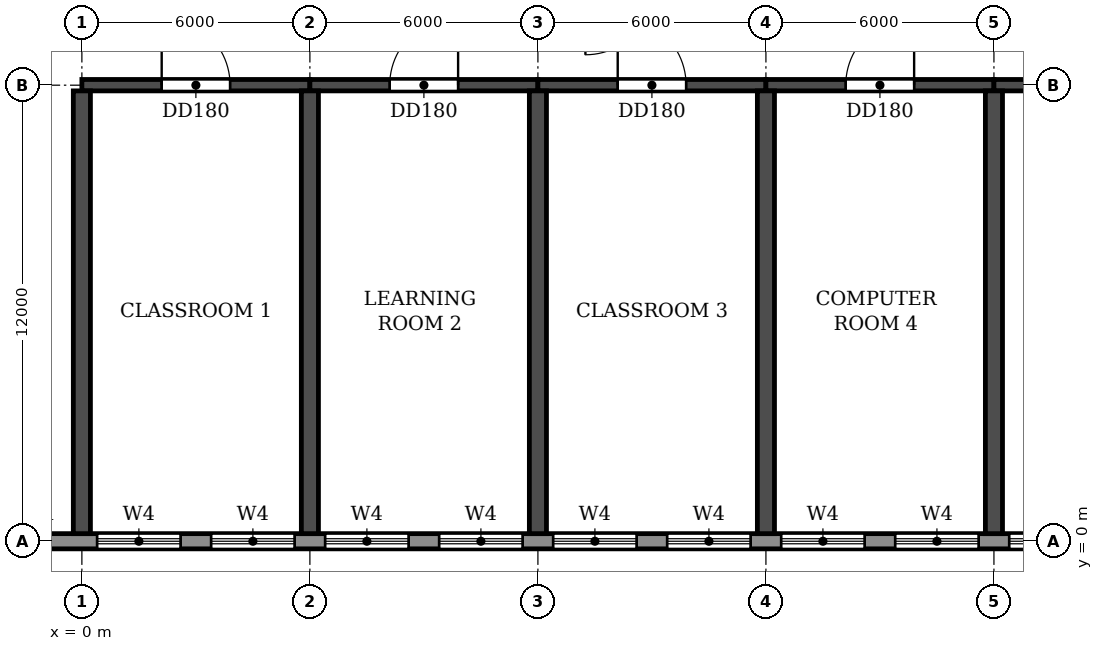
"""IFC4 building model, lengths in metres.
Left out: names, types, materials, properties, quantities, classifications, styles, units other than length and angle.
Written with IfcOpenShell. Run it as: python <this file> out.ifc"""

import sys

from ifc_helpers import new_model, si_unit, direction, frame, frame_2d, origin, place, context, subcontext, project, spatial, rectangle, extrude, element, fill, save


model = new_model("IFC4")
c1 = context("Model", 3, precision=1e-05, world=origin(), true_north=direction((0.0, 1.0)))
c2 = subcontext(c1, "Body", "Model", "MODEL_VIEW")
j1 = project(units=[si_unit("LENGTHUNIT", "METRE"), si_unit("PLANEANGLEUNIT", "RADIAN")], contexts=[c1])
p1 = place(None, origin())
s1 = spatial("IfcSite", under=j1, at=p1, CompositionType="ELEMENT")
p2 = place(p1, origin())
s2 = spatial("IfcBuilding", under=s1, at=p2, CompositionType="ELEMENT")
p3 = place(p2, frame((0.0, 0.0, 15.0)))
s3 = spatial("IfcBuildingStorey", under=s2, at=p3, CompositionType="ELEMENT", Elevation=15.0)
for number, where, z_axis, x_axis in (
    (1, (0.0, 0.2, 0.0), (0.0, 0.0, 1.0), (0.0, 1.0, 0.0)),
    (2, (6.0, 0.2, 0.0), (0.0, 0.0, 1.0), (0.0, 1.0, 0.0)),
    (3, (12.0, 0.2, 0.0), (0.0, 0.0, 1.0), (0.0, 1.0, 0.0)),
    (4, (18.0, 0.2, 0.0), (0.0, 0.0, 1.0), (0.0, 1.0, 0.0)),
    (5, (24.0, 0.2, 0.0), (0.0, 0.0, 1.0), (0.0, 1.0, 0.0)),
):
    element("IfcWall", number, at=place(p3, frame(where, z_axis=z_axis, x_axis=x_axis)), inside=s3, PredefinedType="SHEAR", context=c2, shape_type="SweptSolid", body=[
        extrude(rectangle(XDim=11.65, YDim=0.45, at=frame_2d((5.825, 0.0))), origin(), (0.0, 0.0, 1.0), 3.92),
    ])
p4 = place(p3, frame((0.0, 12.0, 0.0), z_axis=(0.0, 0.0, 1.0), x_axis=(1.0, 0.0, 0.0)))
e6 = element("IfcWall", 6, at=p4, inside=s3, PredefinedType="SHEAR", context=c2, shape_type="SweptSolid", body=[
    extrude(rectangle(XDim=6.0, YDim=0.3, at=frame_2d((3.0, 0.0))), origin(), (0.0, 0.0, 1.0), 3.32),
])
p5 = place(p4, frame((2.1, 0.0, 0.0)))
e7 = element("IfcOpeningElement", 7, at=p5, cuts=e6, PredefinedType="OPENING", context=c2, shape_type="SweptSolid", body=[
    extrude(rectangle(XDim=1.8, YDim=2.1, at=frame_2d((0.9, 1.05))), frame((0.0, 0.16, 0.0), z_axis=(0.0, -1.0, 0.0), x_axis=(1.0, 0.0, 0.0)), (0.0, 0.0, 1.0), 0.32),
])
p6 = place(p3, frame((6.0, 12.0, 0.0), z_axis=(0.0, 0.0, 1.0), x_axis=(1.0, 0.0, 0.0)))
e8 = element("IfcWall", 8, at=p6, inside=s3, PredefinedType="SHEAR", context=c2, shape_type="SweptSolid", body=[
    extrude(rectangle(XDim=6.0, YDim=0.3, at=frame_2d((3.0, 0.0))), origin(), (0.0, 0.0, 1.0), 3.32),
])
p7 = place(p6, frame((2.1, 0.0, 0.0)))
e9 = element("IfcOpeningElement", 9, at=p7, cuts=e8, PredefinedType="OPENING", context=c2, shape_type="SweptSolid", body=[
    extrude(rectangle(XDim=1.8, YDim=2.1, at=frame_2d((0.9, 1.05))), frame((0.0, 0.16, 0.0), z_axis=(0.0, -1.0, 0.0), x_axis=(1.0, 0.0, 0.0)), (0.0, 0.0, 1.0), 0.32),
])
p8 = place(p3, frame((12.0, 12.0, 0.0), z_axis=(0.0, 0.0, 1.0), x_axis=(1.0, 0.0, 0.0)))
e10 = element("IfcWall", 10, at=p8, inside=s3, PredefinedType="SHEAR", context=c2, shape_type="SweptSolid", body=[
    extrude(rectangle(XDim=6.0, YDim=0.3, at=frame_2d((3.0, 0.0))), origin(), (0.0, 0.0, 1.0), 3.32),
])
p9 = place(p8, frame((2.1, 0.0, 0.0)))
e11 = element("IfcOpeningElement", 11, at=p9, cuts=e10, PredefinedType="OPENING", context=c2, shape_type="SweptSolid", body=[
    extrude(rectangle(XDim=1.8, YDim=2.1, at=frame_2d((0.9, 1.05))), frame((0.0, 0.16, 0.0), z_axis=(0.0, -1.0, 0.0), x_axis=(1.0, 0.0, 0.0)), (0.0, 0.0, 1.0), 0.32),
])
p10 = place(p3, frame((18.0, 12.0, 0.0), z_axis=(0.0, 0.0, 1.0), x_axis=(1.0, 0.0, 0.0)))
e12 = element("IfcWall", 12, at=p10, inside=s3, PredefinedType="SHEAR", context=c2, shape_type="SweptSolid", body=[
    extrude(rectangle(XDim=6.0, YDim=0.3, at=frame_2d((3.0, 0.0))), origin(), (0.0, 0.0, 1.0), 3.32),
])
p11 = place(p10, frame((2.1, 0.0, 0.0)))
e13 = element("IfcOpeningElement", 13, at=p11, cuts=e12, PredefinedType="OPENING", context=c2, shape_type="SweptSolid", body=[
    extrude(rectangle(XDim=1.8, YDim=2.1, at=frame_2d((0.9, 1.05))), frame((0.0, 0.16, 0.0), z_axis=(0.0, -1.0, 0.0), x_axis=(1.0, 0.0, 0.0)), (0.0, 0.0, 1.0), 0.32),
])
p12 = place(p3, frame((24.0, 12.0, 0.0), z_axis=(0.0, 0.0, 1.0), x_axis=(1.0, 0.0, 0.0)))
e14 = element("IfcWall", 14, at=p12, inside=s3, PredefinedType="SHEAR", context=c2, shape_type="SweptSolid", body=[
    extrude(rectangle(XDim=6.0, YDim=0.3, at=frame_2d((3.0, 0.0))), origin(), (0.0, 0.0, 1.0), 3.32),
])
p13 = place(p12, frame((2.1, 0.0, 0.0)))
e15 = element("IfcOpeningElement", 15, at=p13, cuts=e14, PredefinedType="OPENING", context=c2, shape_type="SweptSolid", body=[
    extrude(rectangle(XDim=1.8, YDim=2.1, at=frame_2d((0.9, 1.05))), frame((0.0, 0.16, 0.0), z_axis=(0.0, -1.0, 0.0), x_axis=(1.0, 0.0, 0.0)), (0.0, 0.0, 1.0), 0.32),
])
p14 = place(p3, frame((-3.0, 0.0, 0.0), z_axis=(0.0, 0.0, 1.0), x_axis=(1.0, 0.0, 0.0)))
e16 = element("IfcWall", 16, at=p14, inside=s3, PredefinedType="STANDARD", context=c2, shape_type="SweptSolid", body=[
    extrude(rectangle(XDim=108.0, YDim=0.4, at=frame_2d((54.0, 0.0))), origin(), (0.0, 0.0, 1.0), 3.92),
])
p15 = place(p14, frame((3.4, 0.0, 0.9)))
e17 = element("IfcOpeningElement", 17, at=p15, cuts=e16, PredefinedType="OPENING", context=c2, shape_type="SweptSolid", body=[
    extrude(rectangle(XDim=2.2, YDim=2.7, at=frame_2d((1.1, 1.35))), frame((0.0, 0.21, 0.0), z_axis=(0.0, -1.0, 0.0), x_axis=(1.0, 0.0, 0.0)), (0.0, 0.0, 1.0), 0.42),
])
p16 = place(p14, frame((6.4, 0.0, 0.9)))
e18 = element("IfcOpeningElement", 18, at=p16, cuts=e16, PredefinedType="OPENING", context=c2, shape_type="SweptSolid", body=[
    extrude(rectangle(XDim=2.2, YDim=2.7, at=frame_2d((1.1, 1.35))), frame((0.0, 0.21, 0.0), z_axis=(0.0, -1.0, 0.0), x_axis=(1.0, 0.0, 0.0)), (0.0, 0.0, 1.0), 0.42),
])
p17 = place(p14, frame((9.4, 0.0, 0.9)))
e19 = element("IfcOpeningElement", 19, at=p17, cuts=e16, PredefinedType="OPENING", context=c2, shape_type="SweptSolid", body=[
    extrude(rectangle(XDim=2.2, YDim=2.7, at=frame_2d((1.1, 1.35))), frame((0.0, 0.21, 0.0), z_axis=(0.0, -1.0, 0.0), x_axis=(1.0, 0.0, 0.0)), (0.0, 0.0, 1.0), 0.42),
])
p18 = place(p14, frame((12.4, 0.0, 0.9)))
e20 = element("IfcOpeningElement", 20, at=p18, cuts=e16, PredefinedType="OPENING", context=c2, shape_type="SweptSolid", body=[
    extrude(rectangle(XDim=2.2, YDim=2.7, at=frame_2d((1.1, 1.35))), frame((0.0, 0.21, 0.0), z_axis=(0.0, -1.0, 0.0), x_axis=(1.0, 0.0, 0.0)), (0.0, 0.0, 1.0), 0.42),
])
p19 = place(p14, frame((15.4, 0.0, 0.9)))
e21 = element("IfcOpeningElement", 21, at=p19, cuts=e16, PredefinedType="OPENING", context=c2, shape_type="SweptSolid", body=[
    extrude(rectangle(XDim=2.2, YDim=2.7, at=frame_2d((1.1, 1.35))), frame((0.0, 0.21, 0.0), z_axis=(0.0, -1.0, 0.0), x_axis=(1.0, 0.0, 0.0)), (0.0, 0.0, 1.0), 0.42),
])
p20 = place(p14, frame((18.4, 0.0, 0.9)))
e22 = element("IfcOpeningElement", 22, at=p20, cuts=e16, PredefinedType="OPENING", context=c2, shape_type="SweptSolid", body=[
    extrude(rectangle(XDim=2.2, YDim=2.7, at=frame_2d((1.1, 1.35))), frame((0.0, 0.21, 0.0), z_axis=(0.0, -1.0, 0.0), x_axis=(1.0, 0.0, 0.0)), (0.0, 0.0, 1.0), 0.42),
])
p21 = place(p14, frame((21.4, 0.0, 0.9)))
e23 = element("IfcOpeningElement", 23, at=p21, cuts=e16, PredefinedType="OPENING", context=c2, shape_type="SweptSolid", body=[
    extrude(rectangle(XDim=2.2, YDim=2.7, at=frame_2d((1.1, 1.35))), frame((0.0, 0.21, 0.0), z_axis=(0.0, -1.0, 0.0), x_axis=(1.0, 0.0, 0.0)), (0.0, 0.0, 1.0), 0.42),
])
p22 = place(p14, frame((24.4, 0.0, 0.9)))
e24 = element("IfcOpeningElement", 24, at=p22, cuts=e16, PredefinedType="OPENING", context=c2, shape_type="SweptSolid", body=[
    extrude(rectangle(XDim=2.2, YDim=2.7, at=frame_2d((1.1, 1.35))), frame((0.0, 0.21, 0.0), z_axis=(0.0, -1.0, 0.0), x_axis=(1.0, 0.0, 0.0)), (0.0, 0.0, 1.0), 0.42),
])
p23 = place(p14, frame((27.4, 0.0, 0.9)))
e25 = element("IfcOpeningElement", 25, at=p23, cuts=e16, PredefinedType="OPENING", context=c2, shape_type="SweptSolid", body=[
    extrude(rectangle(XDim=2.2, YDim=2.7, at=frame_2d((1.1, 1.35))), frame((0.0, 0.21, 0.0), z_axis=(0.0, -1.0, 0.0), x_axis=(1.0, 0.0, 0.0)), (0.0, 0.0, 1.0), 0.42),
])
p24 = place(p14, frame((30.4, 0.0, 0.9)))
e26 = element("IfcOpeningElement", 26, at=p24, cuts=e16, PredefinedType="OPENING", context=c2, shape_type="SweptSolid", body=[
    extrude(rectangle(XDim=2.2, YDim=2.7, at=frame_2d((1.1, 1.35))), frame((0.0, 0.21, 0.0), z_axis=(0.0, -1.0, 0.0), x_axis=(1.0, 0.0, 0.0)), (0.0, 0.0, 1.0), 0.42),
])
p25 = place(p14, frame((33.4, 0.0, 0.9)))
e27 = element("IfcOpeningElement", 27, at=p25, cuts=e16, PredefinedType="OPENING", context=c2, shape_type="SweptSolid", body=[
    extrude(rectangle(XDim=2.2, YDim=2.7, at=frame_2d((1.1, 1.35))), frame((0.0, 0.21, 0.0), z_axis=(0.0, -1.0, 0.0), x_axis=(1.0, 0.0, 0.0)), (0.0, 0.0, 1.0), 0.42),
])
p26 = place(p14, frame((36.4, 0.0, 0.9)))
e28 = element("IfcOpeningElement", 28, at=p26, cuts=e16, PredefinedType="OPENING", context=c2, shape_type="SweptSolid", body=[
    extrude(rectangle(XDim=2.2, YDim=2.7, at=frame_2d((1.1, 1.35))), frame((0.0, 0.21, 0.0), z_axis=(0.0, -1.0, 0.0), x_axis=(1.0, 0.0, 0.0)), (0.0, 0.0, 1.0), 0.42),
])
p27 = place(p14, frame((39.4, 0.0, 0.9)))
e29 = element("IfcOpeningElement", 29, at=p27, cuts=e16, PredefinedType="OPENING", context=c2, shape_type="SweptSolid", body=[
    extrude(rectangle(XDim=2.2, YDim=2.7, at=frame_2d((1.1, 1.35))), frame((0.0, 0.21, 0.0), z_axis=(0.0, -1.0, 0.0), x_axis=(1.0, 0.0, 0.0)), (0.0, 0.0, 1.0), 0.42),
])
p28 = place(p14, frame((42.4, 0.0, 0.9)))
e30 = element("IfcOpeningElement", 30, at=p28, cuts=e16, PredefinedType="OPENING", context=c2, shape_type="SweptSolid", body=[
    extrude(rectangle(XDim=2.2, YDim=2.7, at=frame_2d((1.1, 1.35))), frame((0.0, 0.21, 0.0), z_axis=(0.0, -1.0, 0.0), x_axis=(1.0, 0.0, 0.0)), (0.0, 0.0, 1.0), 0.42),
])
p29 = place(p14, frame((45.4, 0.0, 0.9)))
e31 = element("IfcOpeningElement", 31, at=p29, cuts=e16, PredefinedType="OPENING", context=c2, shape_type="SweptSolid", body=[
    extrude(rectangle(XDim=2.2, YDim=2.7, at=frame_2d((1.1, 1.35))), frame((0.0, 0.21, 0.0), z_axis=(0.0, -1.0, 0.0), x_axis=(1.0, 0.0, 0.0)), (0.0, 0.0, 1.0), 0.42),
])
p30 = place(p14, frame((48.4, 0.0, 0.9)))
e32 = element("IfcOpeningElement", 32, at=p30, cuts=e16, PredefinedType="OPENING", context=c2, shape_type="SweptSolid", body=[
    extrude(rectangle(XDim=2.2, YDim=2.7, at=frame_2d((1.1, 1.35))), frame((0.0, 0.21, 0.0), z_axis=(0.0, -1.0, 0.0), x_axis=(1.0, 0.0, 0.0)), (0.0, 0.0, 1.0), 0.42),
])
p31 = place(p14, frame((51.4, 0.0, 0.9)))
e33 = element("IfcOpeningElement", 33, at=p31, cuts=e16, PredefinedType="OPENING", context=c2, shape_type="SweptSolid", body=[
    extrude(rectangle(XDim=2.2, YDim=2.7, at=frame_2d((1.1, 1.35))), frame((0.0, 0.21, 0.0), z_axis=(0.0, -1.0, 0.0), x_axis=(1.0, 0.0, 0.0)), (0.0, 0.0, 1.0), 0.42),
])
p32 = place(p14, frame((54.4, 0.0, 0.9)))
e34 = element("IfcOpeningElement", 34, at=p32, cuts=e16, PredefinedType="OPENING", context=c2, shape_type="SweptSolid", body=[
    extrude(rectangle(XDim=2.2, YDim=2.7, at=frame_2d((1.1, 1.35))), frame((0.0, 0.21, 0.0), z_axis=(0.0, -1.0, 0.0), x_axis=(1.0, 0.0, 0.0)), (0.0, 0.0, 1.0), 0.42),
])
p33 = place(p14, frame((57.4, 0.0, 0.9)))
e35 = element("IfcOpeningElement", 35, at=p33, cuts=e16, PredefinedType="OPENING", context=c2, shape_type="SweptSolid", body=[
    extrude(rectangle(XDim=2.2, YDim=2.7, at=frame_2d((1.1, 1.35))), frame((0.0, 0.21, 0.0), z_axis=(0.0, -1.0, 0.0), x_axis=(1.0, 0.0, 0.0)), (0.0, 0.0, 1.0), 0.42),
])
p34 = place(p14, frame((60.4, 0.0, 0.9)))
e36 = element("IfcOpeningElement", 36, at=p34, cuts=e16, PredefinedType="OPENING", context=c2, shape_type="SweptSolid", body=[
    extrude(rectangle(XDim=2.2, YDim=2.7, at=frame_2d((1.1, 1.35))), frame((0.0, 0.21, 0.0), z_axis=(0.0, -1.0, 0.0), x_axis=(1.0, 0.0, 0.0)), (0.0, 0.0, 1.0), 0.42),
])
p35 = place(p14, frame((63.4, 0.0, 0.9)))
e37 = element("IfcOpeningElement", 37, at=p35, cuts=e16, PredefinedType="OPENING", context=c2, shape_type="SweptSolid", body=[
    extrude(rectangle(XDim=2.2, YDim=2.7, at=frame_2d((1.1, 1.35))), frame((0.0, 0.21, 0.0), z_axis=(0.0, -1.0, 0.0), x_axis=(1.0, 0.0, 0.0)), (0.0, 0.0, 1.0), 0.42),
])
p36 = place(p14, frame((66.4, 0.0, 0.9)))
e38 = element("IfcOpeningElement", 38, at=p36, cuts=e16, PredefinedType="OPENING", context=c2, shape_type="SweptSolid", body=[
    extrude(rectangle(XDim=2.2, YDim=2.7, at=frame_2d((1.1, 1.35))), frame((0.0, 0.21, 0.0), z_axis=(0.0, -1.0, 0.0), x_axis=(1.0, 0.0, 0.0)), (0.0, 0.0, 1.0), 0.42),
])
p37 = place(p14, frame((69.4, 0.0, 0.9)))
e39 = element("IfcOpeningElement", 39, at=p37, cuts=e16, PredefinedType="OPENING", context=c2, shape_type="SweptSolid", body=[
    extrude(rectangle(XDim=2.2, YDim=2.7, at=frame_2d((1.1, 1.35))), frame((0.0, 0.21, 0.0), z_axis=(0.0, -1.0, 0.0), x_axis=(1.0, 0.0, 0.0)), (0.0, 0.0, 1.0), 0.42),
])
p38 = place(p14, frame((72.4, 0.0, 0.9)))
e40 = element("IfcOpeningElement", 40, at=p38, cuts=e16, PredefinedType="OPENING", context=c2, shape_type="SweptSolid", body=[
    extrude(rectangle(XDim=2.2, YDim=2.7, at=frame_2d((1.1, 1.35))), frame((0.0, 0.21, 0.0), z_axis=(0.0, -1.0, 0.0), x_axis=(1.0, 0.0, 0.0)), (0.0, 0.0, 1.0), 0.42),
])
p39 = place(p14, frame((75.4, 0.0, 0.9)))
e41 = element("IfcOpeningElement", 41, at=p39, cuts=e16, PredefinedType="OPENING", context=c2, shape_type="SweptSolid", body=[
    extrude(rectangle(XDim=2.2, YDim=2.7, at=frame_2d((1.1, 1.35))), frame((0.0, 0.21, 0.0), z_axis=(0.0, -1.0, 0.0), x_axis=(1.0, 0.0, 0.0)), (0.0, 0.0, 1.0), 0.42),
])
p40 = place(p14, frame((78.4, 0.0, 0.9)))
e42 = element("IfcOpeningElement", 42, at=p40, cuts=e16, PredefinedType="OPENING", context=c2, shape_type="SweptSolid", body=[
    extrude(rectangle(XDim=2.2, YDim=2.7, at=frame_2d((1.1, 1.35))), frame((0.0, 0.21, 0.0), z_axis=(0.0, -1.0, 0.0), x_axis=(1.0, 0.0, 0.0)), (0.0, 0.0, 1.0), 0.42),
])
p41 = place(p14, frame((81.4, 0.0, 0.9)))
e43 = element("IfcOpeningElement", 43, at=p41, cuts=e16, PredefinedType="OPENING", context=c2, shape_type="SweptSolid", body=[
    extrude(rectangle(XDim=2.2, YDim=2.7, at=frame_2d((1.1, 1.35))), frame((0.0, 0.21, 0.0), z_axis=(0.0, -1.0, 0.0), x_axis=(1.0, 0.0, 0.0)), (0.0, 0.0, 1.0), 0.42),
])
p42 = place(p14, frame((84.4, 0.0, 0.9)))
e44 = element("IfcOpeningElement", 44, at=p42, cuts=e16, PredefinedType="OPENING", context=c2, shape_type="SweptSolid", body=[
    extrude(rectangle(XDim=2.2, YDim=2.7, at=frame_2d((1.1, 1.35))), frame((0.0, 0.21, 0.0), z_axis=(0.0, -1.0, 0.0), x_axis=(1.0, 0.0, 0.0)), (0.0, 0.0, 1.0), 0.42),
])
p43 = place(p14, frame((87.4, 0.0, 0.9)))
e45 = element("IfcOpeningElement", 45, at=p43, cuts=e16, PredefinedType="OPENING", context=c2, shape_type="SweptSolid", body=[
    extrude(rectangle(XDim=2.2, YDim=2.7, at=frame_2d((1.1, 1.35))), frame((0.0, 0.21, 0.0), z_axis=(0.0, -1.0, 0.0), x_axis=(1.0, 0.0, 0.0)), (0.0, 0.0, 1.0), 0.42),
])
p44 = place(p14, frame((90.4, 0.0, 0.9)))
e46 = element("IfcOpeningElement", 46, at=p44, cuts=e16, PredefinedType="OPENING", context=c2, shape_type="SweptSolid", body=[
    extrude(rectangle(XDim=2.2, YDim=2.7, at=frame_2d((1.1, 1.35))), frame((0.0, 0.21, 0.0), z_axis=(0.0, -1.0, 0.0), x_axis=(1.0, 0.0, 0.0)), (0.0, 0.0, 1.0), 0.42),
])
p45 = place(p14, frame((93.4, 0.0, 0.9)))
e47 = element("IfcOpeningElement", 47, at=p45, cuts=e16, PredefinedType="OPENING", context=c2, shape_type="SweptSolid", body=[
    extrude(rectangle(XDim=2.2, YDim=2.7, at=frame_2d((1.1, 1.35))), frame((0.0, 0.21, 0.0), z_axis=(0.0, -1.0, 0.0), x_axis=(1.0, 0.0, 0.0)), (0.0, 0.0, 1.0), 0.42),
])
p46 = place(p14, frame((96.4, 0.0, 0.9)))
e48 = element("IfcOpeningElement", 48, at=p46, cuts=e16, PredefinedType="OPENING", context=c2, shape_type="SweptSolid", body=[
    extrude(rectangle(XDim=2.2, YDim=2.7, at=frame_2d((1.1, 1.35))), frame((0.0, 0.21, 0.0), z_axis=(0.0, -1.0, 0.0), x_axis=(1.0, 0.0, 0.0)), (0.0, 0.0, 1.0), 0.42),
])
p47 = place(p14, frame((99.4, 0.0, 0.9)))
e49 = element("IfcOpeningElement", 49, at=p47, cuts=e16, PredefinedType="OPENING", context=c2, shape_type="SweptSolid", body=[
    extrude(rectangle(XDim=2.2, YDim=2.7, at=frame_2d((1.1, 1.35))), frame((0.0, 0.21, 0.0), z_axis=(0.0, -1.0, 0.0), x_axis=(1.0, 0.0, 0.0)), (0.0, 0.0, 1.0), 0.42),
])
p48 = place(p14, frame((102.4, 0.0, 0.9)))
e50 = element("IfcOpeningElement", 50, at=p48, cuts=e16, PredefinedType="OPENING", context=c2, shape_type="SweptSolid", body=[
    extrude(rectangle(XDim=2.2, YDim=2.7, at=frame_2d((1.1, 1.35))), frame((0.0, 0.21, 0.0), z_axis=(0.0, -1.0, 0.0), x_axis=(1.0, 0.0, 0.0)), (0.0, 0.0, 1.0), 0.42),
])
p49 = place(p15, origin())
e51 = element("IfcWindow", 51, at=p49, inside=s3, PartitioningType="DOUBLE_PANEL_HORIZONTAL", PredefinedType="WINDOW", context=c2, shape_type="SweptSolid", body=[
    extrude(rectangle(XDim=2.2, YDim=2.7, at=frame_2d((1.1, 1.35))), frame((0.0, 0.03, 0.0), z_axis=(0.0, -1.0, 0.0), x_axis=(1.0, 0.0, 0.0)), (0.0, 0.0, 1.0), 0.06),
])
fill(e17, e51)
p50 = place(p16, origin())
e52 = element("IfcWindow", 52, at=p50, inside=s3, PartitioningType="DOUBLE_PANEL_HORIZONTAL", PredefinedType="WINDOW", context=c2, shape_type="SweptSolid", body=[
    extrude(rectangle(XDim=2.2, YDim=2.7, at=frame_2d((1.1, 1.35))), frame((0.0, 0.03, 0.0), z_axis=(0.0, -1.0, 0.0), x_axis=(1.0, 0.0, 0.0)), (0.0, 0.0, 1.0), 0.06),
])
fill(e18, e52)
p51 = place(p17, origin())
e53 = element("IfcWindow", 53, at=p51, inside=s3, PartitioningType="DOUBLE_PANEL_HORIZONTAL", PredefinedType="WINDOW", context=c2, shape_type="SweptSolid", body=[
    extrude(rectangle(XDim=2.2, YDim=2.7, at=frame_2d((1.1, 1.35))), frame((0.0, 0.03, 0.0), z_axis=(0.0, -1.0, 0.0), x_axis=(1.0, 0.0, 0.0)), (0.0, 0.0, 1.0), 0.06),
])
fill(e19, e53)
p52 = place(p18, origin())
e54 = element("IfcWindow", 54, at=p52, inside=s3, PartitioningType="DOUBLE_PANEL_HORIZONTAL", PredefinedType="WINDOW", context=c2, shape_type="SweptSolid", body=[
    extrude(rectangle(XDim=2.2, YDim=2.7, at=frame_2d((1.1, 1.35))), frame((0.0, 0.03, 0.0), z_axis=(0.0, -1.0, 0.0), x_axis=(1.0, 0.0, 0.0)), (0.0, 0.0, 1.0), 0.06),
])
fill(e20, e54)
p53 = place(p19, origin())
e55 = element("IfcWindow", 55, at=p53, inside=s3, PartitioningType="DOUBLE_PANEL_HORIZONTAL", PredefinedType="WINDOW", context=c2, shape_type="SweptSolid", body=[
    extrude(rectangle(XDim=2.2, YDim=2.7, at=frame_2d((1.1, 1.35))), frame((0.0, 0.03, 0.0), z_axis=(0.0, -1.0, 0.0), x_axis=(1.0, 0.0, 0.0)), (0.0, 0.0, 1.0), 0.06),
])
fill(e21, e55)
p54 = place(p20, origin())
e56 = element("IfcWindow", 56, at=p54, inside=s3, PartitioningType="DOUBLE_PANEL_HORIZONTAL", PredefinedType="WINDOW", context=c2, shape_type="SweptSolid", body=[
    extrude(rectangle(XDim=2.2, YDim=2.7, at=frame_2d((1.1, 1.35))), frame((0.0, 0.03, 0.0), z_axis=(0.0, -1.0, 0.0), x_axis=(1.0, 0.0, 0.0)), (0.0, 0.0, 1.0), 0.06),
])
fill(e22, e56)
p55 = place(p21, origin())
e57 = element("IfcWindow", 57, at=p55, inside=s3, PartitioningType="DOUBLE_PANEL_HORIZONTAL", PredefinedType="WINDOW", context=c2, shape_type="SweptSolid", body=[
    extrude(rectangle(XDim=2.2, YDim=2.7, at=frame_2d((1.1, 1.35))), frame((0.0, 0.03, 0.0), z_axis=(0.0, -1.0, 0.0), x_axis=(1.0, 0.0, 0.0)), (0.0, 0.0, 1.0), 0.06),
])
fill(e23, e57)
p56 = place(p22, origin())
e58 = element("IfcWindow", 58, at=p56, inside=s3, PartitioningType="DOUBLE_PANEL_HORIZONTAL", PredefinedType="WINDOW", context=c2, shape_type="SweptSolid", body=[
    extrude(rectangle(XDim=2.2, YDim=2.7, at=frame_2d((1.1, 1.35))), frame((0.0, 0.03, 0.0), z_axis=(0.0, -1.0, 0.0), x_axis=(1.0, 0.0, 0.0)), (0.0, 0.0, 1.0), 0.06),
])
fill(e24, e58)
p57 = place(p23, origin())
e59 = element("IfcWindow", 59, at=p57, inside=s3, PartitioningType="DOUBLE_PANEL_HORIZONTAL", PredefinedType="WINDOW", context=c2, shape_type="SweptSolid", body=[
    extrude(rectangle(XDim=2.2, YDim=2.7, at=frame_2d((1.1, 1.35))), frame((0.0, 0.03, 0.0), z_axis=(0.0, -1.0, 0.0), x_axis=(1.0, 0.0, 0.0)), (0.0, 0.0, 1.0), 0.06),
])
fill(e25, e59)
p58 = place(p5, origin())
e60 = element("IfcDoor", 60, at=p58, inside=s3, OperationType="DOUBLE_DOOR_SINGLE_SWING", PredefinedType="DOOR", context=c2, shape_type="SweptSolid", body=[
    extrude(rectangle(XDim=1.8, YDim=2.1, at=frame_2d((0.9, 1.05))), frame((0.0, 0.025, 0.0), z_axis=(0.0, -1.0, 0.0), x_axis=(1.0, 0.0, 0.0)), (0.0, 0.0, 1.0), 0.05),
])
fill(e7, e60)
p59 = place(p7, origin())
e61 = element("IfcDoor", 61, at=p59, inside=s3, OperationType="DOUBLE_DOOR_SINGLE_SWING", PredefinedType="DOOR", context=c2, shape_type="SweptSolid", body=[
    extrude(rectangle(XDim=1.8, YDim=2.1, at=frame_2d((0.9, 1.05))), frame((0.0, 0.025, 0.0), z_axis=(0.0, -1.0, 0.0), x_axis=(1.0, 0.0, 0.0)), (0.0, 0.0, 1.0), 0.05),
])
fill(e9, e61)
p60 = place(p9, origin())
e62 = element("IfcDoor", 62, at=p60, inside=s3, OperationType="DOUBLE_DOOR_SINGLE_SWING", PredefinedType="DOOR", context=c2, shape_type="SweptSolid", body=[
    extrude(rectangle(XDim=1.8, YDim=2.1, at=frame_2d((0.9, 1.05))), frame((0.0, 0.025, 0.0), z_axis=(0.0, -1.0, 0.0), x_axis=(1.0, 0.0, 0.0)), (0.0, 0.0, 1.0), 0.05),
])
fill(e11, e62)
p61 = place(p11, origin())
e63 = element("IfcDoor", 63, at=p61, inside=s3, OperationType="DOUBLE_DOOR_SINGLE_SWING", PredefinedType="DOOR", context=c2, shape_type="SweptSolid", body=[
    extrude(rectangle(XDim=1.8, YDim=2.1, at=frame_2d((0.9, 1.05))), frame((0.0, 0.025, 0.0), z_axis=(0.0, -1.0, 0.0), x_axis=(1.0, 0.0, 0.0)), (0.0, 0.0, 1.0), 0.05),
])
fill(e13, e63)
save(model, sys.argv[1])
